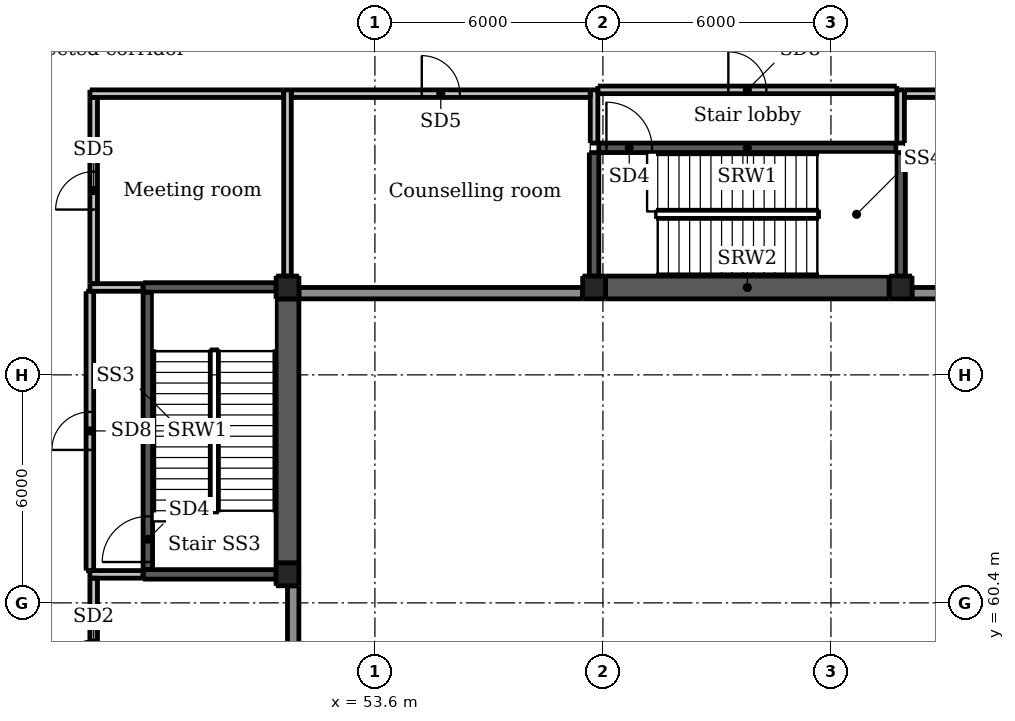
"""IFC4 building model, lengths in metres.
Left out: names, types, materials, properties, quantities, classifications, styles, units other than length and angle.
Written with IfcOpenShell. Run it as: python <this file> out.ifc"""

import sys

from ifc_helpers import new_model, si_unit, direction, frame, frame_2d, origin, origin_2d, place, context, subcontext, project, spatial, rectangle, extrude, element, fill, save


model = new_model("IFC4")
c1 = context("Model", 3, precision=1e-05, world=origin(), true_north=direction((0.0, 1.0)))
c2 = subcontext(c1, "Body", "Model", "MODEL_VIEW")
j1 = project(units=[si_unit("LENGTHUNIT", "METRE"), si_unit("PLANEANGLEUNIT", "RADIAN")], contexts=[c1])
p1 = place(None, origin())
s1 = spatial("IfcSite", under=j1, at=p1, CompositionType="ELEMENT")
p2 = place(p1, origin())
s2 = spatial("IfcBuilding", under=s1, at=p2, CompositionType="ELEMENT")
p3 = place(p2, origin())
s3 = spatial("IfcBuildingStorey", under=s2, at=p3, CompositionType="ELEMENT", Elevation=0.0)
for number, where, z_axis, x_axis in (
    (1, (59.6, 67.4, -2.5), (0.0, 0.0, 1.0), (1.0, 0.0, 0.0)),
    (2, (65.6, 67.4, -2.5), (0.0, 0.0, 1.0), (1.0, 0.0, 0.0)),
    (3, (52.6, 60.4, -2.5), (0.0, 0.0, 1.0), (1.0, 0.0, 0.0)),
):
    element("IfcColumn", number, at=place(p3, frame(where, z_axis=z_axis, x_axis=x_axis)), inside=s3, PredefinedType="COLUMN", context=c2, shape_type="SweptSolid", body=[
        extrude(rectangle(XDim=1.2, YDim=1.2, at=origin_2d()), origin(), (0.0, 0.0, 1.0), 7.7),
    ])
p4 = place(p3, frame((55.2, 64.8, -2.5), z_axis=(0.0, 0.0, 1.0), x_axis=(1.0, 0.0, 0.0)))
e4 = element("IfcColumn", 4, at=p4, inside=s3, PredefinedType="COLUMN", context=c2, shape_type="SweptSolid", body=[
    extrude(rectangle(XDim=3.2, YDim=3.2, at=origin_2d()), origin(), (0.0, 0.0, 1.0), 7.7),
])
for number, where, z_axis, x_axis in (
    (5, (51.3, 61.15, -0.3), (0.0, 0.0, 1.0), (1.0, 0.0, 0.0)),
    (6, (51.3, 68.7, -0.3), (0.0, 0.0, 1.0), (1.0, 0.0, 0.0)),
    (7, (59.367, 68.7, -0.3), (0.0, 0.0, 1.0), (1.0, 0.0, 0.0)),
    (8, (67.433, 68.7, -0.3), (0.0, 0.0, 1.0), (1.0, 0.0, 0.0)),
):
    element("IfcColumn", number, at=place(p3, frame(where, z_axis=z_axis, x_axis=x_axis)), inside=s3, PredefinedType="COLUMN", context=c2, shape_type="SweptSolid", body=[
        extrude(rectangle(XDim=0.6, YDim=0.6, at=origin_2d()), origin(), (0.0, 0.0, 1.0), 5.5),
    ])
p5 = place(p3, frame((47.625, 61.275, -0.3), z_axis=(0.0, 0.0, 1.0), x_axis=(0.0, 1.0, 0.0)))
e9 = element("IfcWall", 9, at=p5, inside=s3, PredefinedType="SHEAR", context=c2, shape_type="SweptSolid", body=[
    extrude(rectangle(XDim=7.3, YDim=0.25, at=frame_2d((3.65, 0.0))), origin(), (0.0, 0.0, 1.0), 5.5),
])
p6 = place(p5, frame((0.2, 0.0, 0.3)))
e10 = element("IfcOpeningElement", 10, at=p6, cuts=e9, PredefinedType="OPENING", context=c2, shape_type="SweptSolid", body=[
    extrude(rectangle(XDim=1.2, YDim=2.1, at=frame_2d((0.6, 1.05))), frame((0.0, 0.135, 0.0), z_axis=(0.0, -1.0, 0.0), x_axis=(1.0, 0.0, 0.0)), (0.0, 0.0, 1.0), 0.27),
])
for number, where, z_axis, x_axis in (
    (11, (47.5, 61.15, -0.3), (0.0, 0.0, 1.0), (1.0, 0.0, 0.0)),
    (12, (47.5, 68.7, -0.3), (0.0, 0.0, 1.0), (1.0, 0.0, 0.0)),
):
    element("IfcWall", number, at=place(p3, frame(where, z_axis=z_axis, x_axis=x_axis)), inside=s3, PredefinedType="SHEAR", context=c2, shape_type="SweptSolid", body=[
        extrude(rectangle(XDim=3.5, YDim=0.25, at=frame_2d((1.75, 0.0))), origin(), (0.0, 0.0, 1.0), 5.5),
    ])
p7 = place(p3, frame((51.3, 61.45, -0.3), z_axis=(0.0, 0.0, 1.0), x_axis=(0.0, 1.0, 0.0)))
e13 = element("IfcWall", 13, at=p7, inside=s3, PredefinedType="SHEAR", context=c2, shape_type="SweptSolid", body=[
    extrude(rectangle(XDim=6.95, YDim=0.6, at=frame_2d((3.475, 0.0))), origin(), (0.0, 0.0, 1.0), 5.5),
])
p8 = place(p3, frame((59.492, 72.375, -0.3), z_axis=(0.0, 0.0, 1.0), x_axis=(1.0, 0.0, 0.0)))
e14 = element("IfcWall", 14, at=p8, inside=s3, PredefinedType="SHEAR", context=c2, shape_type="SweptSolid", body=[
    extrude(rectangle(XDim=7.816, YDim=0.25, at=frame_2d((3.908, 0.0))), origin(), (0.0, 0.0, 1.0), 5.5),
])
p9 = place(p8, frame((0.2, 0.0, 0.3)))
e15 = element("IfcOpeningElement", 15, at=p9, cuts=e14, PredefinedType="OPENING", context=c2, shape_type="SweptSolid", body=[
    extrude(rectangle(XDim=1.2, YDim=2.1, at=frame_2d((0.6, 1.05))), frame((0.0, 0.135, 0.0), z_axis=(0.0, -1.0, 0.0), x_axis=(1.0, 0.0, 0.0)), (0.0, 0.0, 1.0), 0.27),
])
for number, where, z_axis, x_axis in (
    (16, (59.367, 69.0, -0.3), (0.0, 0.0, 1.0), (0.0, 1.0, 0.0)),
    (17, (67.433, 69.0, -0.3), (0.0, 0.0, 1.0), (0.0, 1.0, 0.0)),
):
    element("IfcWall", number, at=place(p3, frame(where, z_axis=z_axis, x_axis=x_axis)), inside=s3, PredefinedType="SHEAR", context=c2, shape_type="SweptSolid", body=[
        extrude(rectangle(XDim=3.25, YDim=0.25, at=frame_2d((1.625, 0.0))), origin(), (0.0, 0.0, 1.0), 5.5),
    ])
p10 = place(p3, frame((59.667, 68.7, -0.3), z_axis=(0.0, 0.0, 1.0), x_axis=(1.0, 0.0, 0.0)))
e18 = element("IfcWall", 18, at=p10, inside=s3, PredefinedType="SHEAR", context=c2, shape_type="SweptSolid", body=[
    extrude(rectangle(XDim=7.466, YDim=0.6, at=frame_2d((3.733, 0.0))), origin(), (0.0, 0.0, 1.0), 5.5),
])
p11 = place(p3, frame((52.0, 67.875, 0.0), z_axis=(0.0, 0.0, 1.0), x_axis=(1.0, 0.0, 0.0)))
e19 = element("IfcWall", 19, at=p11, inside=s3, PredefinedType="SOLIDWALL", context=c2, shape_type="SweptSolid", body=[
    extrude(rectangle(XDim=7.0, YDim=0.25, at=frame_2d((3.5, 0.0))), origin(), (0.0, 0.0, 1.0), 5.2),
])
for number, where, z_axis, x_axis in (
    (20, (60.2, 67.875, 0.0), (0.0, 0.0, 1.0), (1.0, 0.0, 0.0)),
    (21, (66.2, 67.875, 0.0), (0.0, 0.0, 1.0), (1.0, 0.0, 0.0)),
    (22, (52.125, 55.0, 0.0), (0.0, 0.0, 1.0), (0.0, 1.0, 0.0)),
):
    element("IfcWall", number, at=place(p3, frame(where, z_axis=z_axis, x_axis=x_axis)), inside=s3, PredefinedType="SOLIDWALL", context=c2, shape_type="SweptSolid", body=[
        extrude(rectangle(XDim=4.8, YDim=0.25, at=frame_2d((2.4, 0.0))), origin(), (0.0, 0.0, 1.0), 5.2),
    ])
p12 = place(p3, frame((52.125, 61.0, 0.0), z_axis=(0.0, 0.0, 1.0), x_axis=(0.0, 1.0, 0.0)))
e23 = element("IfcWall", 23, at=p12, inside=s3, PredefinedType="SOLIDWALL", context=c2, shape_type="SweptSolid", body=[
    extrude(rectangle(XDim=7.0, YDim=0.25, at=frame_2d((3.5, 0.0))), origin(), (0.0, 0.0, 1.0), 5.2),
])
p13 = place(p3, frame((51.45, 53.9, 0.0), z_axis=(0.0, 0.0, 1.0), x_axis=(0.0, 1.0, 0.0)))
e24 = element("IfcWall", 24, at=p13, inside=s3, PredefinedType="SOLIDWALL", context=c2, shape_type="SweptSolid", body=[
    extrude(rectangle(XDim=6.95, YDim=0.3, at=frame_2d((3.475, 0.0))), origin(), (0.0, 0.0, 1.0), 4.3),
])
p14 = place(p3, frame((51.6, 68.55, 0.0), z_axis=(0.0, 0.0, 1.0), x_axis=(1.0, 0.0, 0.0)))
e25 = element("IfcWall", 25, at=p14, inside=s3, PredefinedType="SOLIDWALL", context=c2, shape_type="SweptSolid", body=[
    extrude(rectangle(XDim=7.467, YDim=0.3, at=frame_2d((3.733, 0.0))), origin(), (0.0, 0.0, 1.0), 4.3),
])
p15 = place(p3, frame((67.733, 68.55, 0.0), z_axis=(0.0, 0.0, 1.0), x_axis=(1.0, 0.0, 0.0)))
e26 = element("IfcWall", 26, at=p15, inside=s3, PredefinedType="SOLIDWALL", context=c2, shape_type="SweptSolid", body=[
    extrude(rectangle(XDim=7.467, YDim=0.3, at=frame_2d((3.733, 0.0))), origin(), (0.0, 0.0, 1.0), 4.3),
])
p16 = place(p3, frame((53.2, 60.4, 0.0), z_axis=(0.0, 0.0, 1.0), x_axis=(1.0, 0.0, 0.0)))
e27 = element("IfcWall", 27, at=p16, inside=s3, PredefinedType="PARTITIONING", context=c2, shape_type="SweptSolid", body=[
    extrude(rectangle(XDim=6.28, YDim=0.15, at=frame_2d((3.14, 0.0))), origin(), (0.0, 0.0, 1.0), 4.797),
])
p17 = place(p3, frame((59.495, 60.4, 0.0), z_axis=(0.0, 0.0, 1.0), x_axis=(1.0, 0.0, 0.0)))
e28 = element("IfcWall", 28, at=p17, inside=s3, PredefinedType="PARTITIONING", context=c2, shape_type="SweptSolid", body=[
    extrude(rectangle(XDim=0.211, YDim=0.15, at=frame_2d((0.105, 0.0))), origin(), (0.0, 0.0, 1.0), 4.66),
])
p18 = place(p3, frame((59.705, 60.4, 0.0), z_axis=(0.0, 0.0, 1.0), x_axis=(1.0, 0.0, 0.0)))
e29 = element("IfcWall", 29, at=p18, inside=s3, PredefinedType="PARTITIONING", context=c2, shape_type="SweptSolid", body=[
    extrude(rectangle(XDim=5.79, YDim=0.15, at=frame_2d((2.895, 0.0))), origin(), (0.0, 0.0, 1.0), 5.2),
])
p19 = place(p18, frame((2.395, 0.0, 0.0)))
e30 = element("IfcOpeningElement", 30, at=p19, cuts=e29, PredefinedType="OPENING", context=c2, shape_type="SweptSolid", body=[
    extrude(rectangle(XDim=1.0, YDim=2.1, at=frame_2d((0.5, 1.05))), frame((0.0, 0.085, 0.0), z_axis=(0.0, -1.0, 0.0), x_axis=(1.0, 0.0, 0.0)), (0.0, 0.0, 1.0), 0.17),
])
p20 = place(p3, frame((65.495, 60.4, 0.0), z_axis=(0.0, 0.0, 1.0), x_axis=(1.0, 0.0, 0.0)))
e31 = element("IfcWall", 31, at=p20, inside=s3, PredefinedType="PARTITIONING", context=c2, shape_type="SweptSolid", body=[
    extrude(rectangle(XDim=0.18, YDim=0.15, at=frame_2d((0.09, 0.0))), origin(), (0.0, 0.0, 1.0), 4.667),
])
p21 = place(p3, frame((66.425, 63.4, 0.0), z_axis=(0.0, 0.0, 1.0), x_axis=(1.0, 0.0, 0.0)))
e32 = element("IfcWall", 32, at=p21, inside=s3, PredefinedType="PARTITIONING", context=c2, shape_type="SweptSolid", body=[
    extrude(rectangle(XDim=4.35, YDim=0.15, at=frame_2d((2.175, 0.0))), origin(), (0.0, 0.0, 1.0), 5.2),
])
p22 = place(p21, frame((1.675, 0.0, 0.0)))
e33 = element("IfcOpeningElement", 33, at=p22, cuts=e32, PredefinedType="OPENING", context=c2, shape_type="SweptSolid", body=[
    extrude(rectangle(XDim=1.0, YDim=2.1, at=frame_2d((0.5, 1.05))), frame((0.0, 0.085, 0.0), z_axis=(0.0, -1.0, 0.0), x_axis=(1.0, 0.0, 0.0)), (0.0, 0.0, 1.0), 0.17),
])
p23 = place(p3, frame((59.6, 54.505, 0.0), z_axis=(0.0, 0.0, 1.0), x_axis=(0.0, 1.0, 0.0)))
e34 = element("IfcWall", 34, at=p23, inside=s3, PredefinedType="PARTITIONING", context=c2, shape_type="SweptSolid", body=[
    extrude(rectangle(XDim=5.82, YDim=0.15, at=frame_2d((2.91, 0.0))), origin(), (0.0, 0.0, 1.0), 4.66),
])
p24 = place(p23, frame((2.396, 0.0, 0.0)))
e35 = element("IfcOpeningElement", 35, at=p24, cuts=e34, PredefinedType="OPENING", context=c2, shape_type="SweptSolid", body=[
    extrude(rectangle(XDim=1.0, YDim=2.1, at=frame_2d((0.5, 1.05))), frame((0.0, 0.085, 0.0), z_axis=(0.0, -1.0, 0.0), x_axis=(1.0, 0.0, 0.0)), (0.0, 0.0, 1.0), 0.17),
])
p25 = place(p3, frame((65.6, 60.475, 0.0), z_axis=(0.0, 0.0, 1.0), x_axis=(0.0, 1.0, 0.0)))
e36 = element("IfcWall", 36, at=p25, inside=s3, PredefinedType="PARTITIONING", context=c2, shape_type="SweptSolid", body=[
    extrude(rectangle(XDim=6.325, YDim=0.15, at=frame_2d((3.163, 0.0))), origin(), (0.0, 0.0, 1.0), 4.667),
])
p26 = place(p3, frame((66.5, 63.475, 0.0), z_axis=(0.0, 0.0, 1.0), x_axis=(0.0, 1.0, 0.0)))
e37 = element("IfcWall", 37, at=p26, inside=s3, PredefinedType="PARTITIONING", context=c2, shape_type="SweptSolid", body=[
    extrude(rectangle(XDim=3.83, YDim=0.15, at=frame_2d((1.915, 0.0))), origin(), (0.0, 0.0, 1.0), 5.2),
])
p27 = place(p26, frame((1.075, 0.0, 0.0)))
e38 = element("IfcOpeningElement", 38, at=p27, cuts=e37, PredefinedType="OPENING", context=c2, shape_type="SweptSolid", body=[
    extrude(rectangle(XDim=0.8, YDim=2.1, at=frame_2d((0.4, 1.05))), frame((0.0, 0.085, 0.0), z_axis=(0.0, -1.0, 0.0), x_axis=(1.0, 0.0, 0.0)), (0.0, 0.0, 1.0), 0.17),
])
p28 = place(p3, frame((66.5, 67.305, 0.0), z_axis=(0.0, 0.0, 1.0), x_axis=(0.0, 1.0, 0.0)))
e39 = element("IfcWall", 39, at=p28, inside=s3, PredefinedType="PARTITIONING", context=c2, shape_type="SweptSolid", body=[
    extrude(rectangle(XDim=0.19, YDim=0.15, at=frame_2d((0.095, 0.0))), origin(), (0.0, 0.0, 1.0), 4.747),
])
p29 = place(p3, frame((66.5, 67.495, 0.0), z_axis=(0.0, 0.0, 1.0), x_axis=(0.0, 1.0, 0.0)))
e40 = element("IfcWall", 40, at=p29, inside=s3, PredefinedType="PARTITIONING", context=c2, shape_type="SweptSolid", body=[
    extrude(rectangle(XDim=0.245, YDim=0.15, at=frame_2d((0.123, 0.0))), origin(), (0.0, 0.0, 1.0), 5.2),
])
p30 = place(p3, frame((67.76, 63.475, 0.0), z_axis=(0.0, 0.0, 1.0), x_axis=(0.0, 1.0, 0.0)))
e41 = element("IfcWall", 41, at=p30, inside=s3, PredefinedType="PARTITIONING", context=c2, shape_type="SweptSolid", body=[
    extrude(rectangle(XDim=3.83, YDim=0.1, at=frame_2d((1.915, 0.0))), origin(), (0.0, 0.0, 1.0), 5.2),
])
p31 = place(p3, frame((67.76, 67.305, 0.0), z_axis=(0.0, 0.0, 1.0), x_axis=(0.0, 1.0, 0.0)))
e42 = element("IfcWall", 42, at=p31, inside=s3, PredefinedType="PARTITIONING", context=c2, shape_type="SweptSolid", body=[
    extrude(rectangle(XDim=0.19, YDim=0.1, at=frame_2d((0.095, 0.0))), origin(), (0.0, 0.0, 1.0), 4.747),
])
p32 = place(p3, frame((67.76, 67.495, 0.0), z_axis=(0.0, 0.0, 1.0), x_axis=(0.0, 1.0, 0.0)))
e43 = element("IfcWall", 43, at=p32, inside=s3, PredefinedType="PARTITIONING", context=c2, shape_type="SweptSolid", body=[
    extrude(rectangle(XDim=0.245, YDim=0.1, at=frame_2d((0.123, 0.0))), origin(), (0.0, 0.0, 1.0), 5.2),
])
p33 = place(p3, frame((46.2, 56.9, 0.0), z_axis=(0.0, 0.0, 1.0), x_axis=(0.0, 1.0, 0.0)))
e44 = element("IfcWall", 44, at=p33, inside=s3, PredefinedType="PARTITIONING", context=c2, shape_type="SweptSolid", body=[
    extrude(rectangle(XDim=4.15, YDim=0.2, at=frame_2d((2.075, 0.0))), origin(), (0.0, 0.0, 1.0), 4.1),
])
p34 = place(p33, frame((1.625, 0.0, 0.0)))
e45 = element("IfcOpeningElement", 45, at=p34, cuts=e44, PredefinedType="OPENING", context=c2, shape_type="SweptSolid", body=[
    extrude(rectangle(XDim=0.9, YDim=2.1, at=frame_2d((0.45, 1.05))), frame((0.0, 0.11, 0.0), z_axis=(0.0, -1.0, 0.0), x_axis=(1.0, 0.0, 0.0)), (0.0, 0.0, 1.0), 0.22),
])
p35 = place(p3, frame((46.2, 68.8, 0.0), z_axis=(0.0, 0.0, 1.0), x_axis=(0.0, 1.0, 0.0)))
e46 = element("IfcWall", 46, at=p35, inside=s3, PredefinedType="PARTITIONING", context=c2, shape_type="SweptSolid", body=[
    extrude(rectangle(XDim=4.9, YDim=0.2, at=frame_2d((2.45, 0.0))), origin(), (0.0, 0.0, 1.0), 4.1),
])
p36 = place(p35, frame((1.95, 0.0, 0.0)))
e47 = element("IfcOpeningElement", 47, at=p36, cuts=e46, PredefinedType="OPENING", context=c2, shape_type="SweptSolid", body=[
    extrude(rectangle(XDim=1.0, YDim=2.1, at=frame_2d((0.5, 1.05))), frame((0.0, 0.11, 0.0), z_axis=(0.0, -1.0, 0.0), x_axis=(1.0, 0.0, 0.0)), (0.0, 0.0, 1.0), 0.22),
])
for number, where, z_axis, x_axis in (
    (48, (46.1, 61.15, 0.0), (0.0, 0.0, 1.0), (1.0, 0.0, 0.0)),
    (49, (46.1, 68.7, 0.0), (0.0, 0.0, 1.0), (1.0, 0.0, 0.0)),
):
    element("IfcWall", number, at=place(p3, frame(where, z_axis=z_axis, x_axis=x_axis)), inside=s3, PredefinedType="PARTITIONING", context=c2, shape_type="SweptSolid", body=[
        extrude(rectangle(XDim=1.4, YDim=0.2, at=frame_2d((0.7, 0.0))), origin(), (0.0, 0.0, 1.0), 4.1),
    ])
p37 = place(p3, frame((51.4, 73.8, 0.0), z_axis=(0.0, 0.0, 1.0), x_axis=(1.0, 0.0, 0.0)))
e50 = element("IfcWall", 50, at=p37, inside=s3, PredefinedType="PARTITIONING", context=c2, shape_type="SweptSolid", body=[
    extrude(rectangle(XDim=7.867, YDim=0.2, at=frame_2d((3.934, 0.0))), origin(), (0.0, 0.0, 1.0), 4.1),
])
p38 = place(p37, frame((3.434, 0.0, 0.0)))
e51 = element("IfcOpeningElement", 51, at=p38, cuts=e50, PredefinedType="OPENING", context=c2, shape_type="SweptSolid", body=[
    extrude(rectangle(XDim=1.0, YDim=2.1, at=frame_2d((0.5, 1.05))), frame((0.0, 0.11, 0.0), z_axis=(0.0, -1.0, 0.0), x_axis=(1.0, 0.0, 0.0)), (0.0, 0.0, 1.0), 0.22),
])
p39 = place(p3, frame((67.533, 73.8, 0.0), z_axis=(0.0, 0.0, 1.0), x_axis=(1.0, 0.0, 0.0)))
e52 = element("IfcWall", 52, at=p39, inside=s3, PredefinedType="PARTITIONING", context=c2, shape_type="SweptSolid", body=[
    extrude(rectangle(XDim=7.867, YDim=0.2, at=frame_2d((3.934, 0.0))), origin(), (0.0, 0.0, 1.0), 4.1),
])
p40 = place(p39, frame((3.483, 0.0, 0.0)))
e53 = element("IfcOpeningElement", 53, at=p40, cuts=e52, PredefinedType="OPENING", context=c2, shape_type="SweptSolid", body=[
    extrude(rectangle(XDim=0.9, YDim=2.1, at=frame_2d((0.45, 1.05))), frame((0.0, 0.11, 0.0), z_axis=(0.0, -1.0, 0.0), x_axis=(1.0, 0.0, 0.0)), (0.0, 0.0, 1.0), 0.22),
])
for number, where, z_axis, x_axis in (
    (54, (59.367, 72.5, 0.0), (0.0, 0.0, 1.0), (0.0, 1.0, 0.0)),
    (55, (67.433, 72.5, 0.0), (0.0, 0.0, 1.0), (0.0, 1.0, 0.0)),
):
    element("IfcWall", number, at=place(p3, frame(where, z_axis=z_axis, x_axis=x_axis)), inside=s3, PredefinedType="PARTITIONING", context=c2, shape_type="SweptSolid", body=[
        extrude(rectangle(XDim=1.4, YDim=0.2, at=frame_2d((0.7, 0.0))), origin(), (0.0, 0.0, 1.0), 4.1),
    ])
p41 = place(p3, frame((46.1, 73.8, 0.0), z_axis=(0.0, 0.0, 1.0), x_axis=(1.0, 0.0, 0.0)))
e56 = element("IfcWall", 56, at=p41, inside=s3, PredefinedType="PARTITIONING", context=c2, shape_type="SweptSolid", body=[
    extrude(rectangle(XDim=5.1, YDim=0.2, at=frame_2d((2.55, 0.0))), origin(), (0.0, 0.0, 1.0), 4.1),
])
p42 = place(p3, frame((51.3, 69.0, 0.0), z_axis=(0.0, 0.0, 1.0), x_axis=(0.0, 1.0, 0.0)))
e57 = element("IfcWall", 57, at=p42, inside=s3, PredefinedType="PARTITIONING", context=c2, shape_type="SweptSolid", body=[
    extrude(rectangle(XDim=4.9, YDim=0.2, at=frame_2d((2.45, 0.0))), origin(), (0.0, 0.0, 1.0), 4.1),
])
p43 = place(p3, frame((46.1, 61.25, 0.0), z_axis=(0.0, 0.0, 1.0), x_axis=(0.0, 1.0, 0.0)))
e58 = element("IfcWall", 58, at=p43, inside=s3, PredefinedType="PARTITIONING", context=c2, shape_type="SweptSolid", body=[
    extrude(rectangle(XDim=7.35, YDim=0.2, at=frame_2d((3.675, 0.0))), origin(), (0.0, 0.0, 1.0), 4.1),
])
p44 = place(p43, frame((3.175, 0.0, 0.0)))
e59 = element("IfcOpeningElement", 59, at=p44, cuts=e58, PredefinedType="OPENING", context=c2, shape_type="SweptSolid", body=[
    extrude(rectangle(XDim=1.0, YDim=2.1, at=frame_2d((0.5, 1.05))), frame((0.0, 0.11, 0.0), z_axis=(0.0, -1.0, 0.0), x_axis=(1.0, 0.0, 0.0)), (0.0, 0.0, 1.0), 0.22),
])
p45 = place(p3, frame((59.467, 73.9, 0.0), z_axis=(0.0, 0.0, 1.0), x_axis=(1.0, 0.0, 0.0)))
e60 = element("IfcWall", 60, at=p45, inside=s3, PredefinedType="PARTITIONING", context=c2, shape_type="SweptSolid", body=[
    extrude(rectangle(XDim=7.866, YDim=0.2, at=frame_2d((3.933, 0.0))), origin(), (0.0, 0.0, 1.0), 4.1),
])
p46 = place(p45, frame((3.433, 0.0, 0.0)))
e61 = element("IfcOpeningElement", 61, at=p46, cuts=e60, PredefinedType="OPENING", context=c2, shape_type="SweptSolid", body=[
    extrude(rectangle(XDim=1.0, YDim=2.1, at=frame_2d((0.5, 1.05))), frame((0.0, 0.11, 0.0), z_axis=(0.0, -1.0, 0.0), x_axis=(1.0, 0.0, 0.0)), (0.0, 0.0, 1.0), 0.22),
])
p47 = place(p19, origin())
e62 = element("IfcDoor", 62, at=p47, inside=s3, OperationType="SINGLE_SWING_LEFT", PredefinedType="DOOR", context=c2, shape_type="SweptSolid", body=[
    extrude(rectangle(XDim=1.0, YDim=2.1, at=frame_2d((0.5, 1.05))), frame((0.0, 0.025, 0.0), z_axis=(0.0, -1.0, 0.0), x_axis=(1.0, 0.0, 0.0)), (0.0, 0.0, 1.0), 0.05),
])
fill(e30, e62)
p48 = place(p27, origin())
e63 = element("IfcDoor", 63, at=p48, inside=s3, OperationType="SINGLE_SWING_LEFT", PredefinedType="DOOR", context=c2, shape_type="SweptSolid", body=[
    extrude(rectangle(XDim=0.8, YDim=2.1, at=frame_2d((0.4, 1.05))), frame((0.0, 0.025, 0.0), z_axis=(0.0, -1.0, 0.0), x_axis=(1.0, 0.0, 0.0)), (0.0, 0.0, 1.0), 0.05),
])
fill(e38, e63)
p49 = place(p22, origin())
e64 = element("IfcDoor", 64, at=p49, inside=s3, OperationType="SINGLE_SWING_LEFT", PredefinedType="DOOR", context=c2, shape_type="SweptSolid", body=[
    extrude(rectangle(XDim=1.0, YDim=2.1, at=frame_2d((0.5, 1.05))), frame((0.0, 0.025, 0.0), z_axis=(0.0, -1.0, 0.0), x_axis=(1.0, 0.0, 0.0)), (0.0, 0.0, 1.0), 0.05),
])
fill(e33, e64)
p50 = place(p34, origin())
e65 = element("IfcDoor", 65, at=p50, inside=s3, OperationType="SINGLE_SWING_LEFT", PredefinedType="DOOR", context=c2, shape_type="SweptSolid", body=[
    extrude(rectangle(XDim=0.9, YDim=2.1, at=frame_2d((0.45, 1.05))), frame((0.0, 0.025, 0.0), z_axis=(0.0, -1.0, 0.0), x_axis=(1.0, 0.0, 0.0)), (0.0, 0.0, 1.0), 0.05),
])
fill(e45, e65)
p51 = place(p36, origin())
e66 = element("IfcDoor", 66, at=p51, inside=s3, OperationType="SINGLE_SWING_LEFT", PredefinedType="DOOR", context=c2, shape_type="SweptSolid", body=[
    extrude(rectangle(XDim=1.0, YDim=2.1, at=frame_2d((0.5, 1.05))), frame((0.0, 0.025, 0.0), z_axis=(0.0, -1.0, 0.0), x_axis=(1.0, 0.0, 0.0)), (0.0, 0.0, 1.0), 0.05),
])
fill(e47, e66)
p52 = place(p38, origin())
e67 = element("IfcDoor", 67, at=p52, inside=s3, OperationType="SINGLE_SWING_LEFT", PredefinedType="DOOR", context=c2, shape_type="SweptSolid", body=[
    extrude(rectangle(XDim=1.0, YDim=2.1, at=frame_2d((0.5, 1.05))), frame((0.0, 0.025, 0.0), z_axis=(0.0, -1.0, 0.0), x_axis=(1.0, 0.0, 0.0)), (0.0, 0.0, 1.0), 0.05),
])
fill(e51, e67)
p53 = place(p44, origin())
e68 = element("IfcDoor", 68, at=p53, inside=s3, OperationType="SINGLE_SWING_LEFT", PredefinedType="DOOR", context=c2, shape_type="SweptSolid", body=[
    extrude(rectangle(XDim=1.0, YDim=2.1, at=frame_2d((0.5, 1.05))), frame((0.0, 0.025, 0.0), z_axis=(0.0, -1.0, 0.0), x_axis=(1.0, 0.0, 0.0)), (0.0, 0.0, 1.0), 0.05),
])
fill(e59, e68)
p54 = place(p46, origin())
e69 = element("IfcDoor", 69, at=p54, inside=s3, OperationType="SINGLE_SWING_LEFT", PredefinedType="DOOR", context=c2, shape_type="SweptSolid", body=[
    extrude(rectangle(XDim=1.0, YDim=2.1, at=frame_2d((0.5, 1.05))), frame((0.0, 0.025, 0.0), z_axis=(0.0, -1.0, 0.0), x_axis=(1.0, 0.0, 0.0)), (0.0, 0.0, 1.0), 0.05),
])
fill(e61, e69)
p55 = place(p6, origin())
e70 = element("IfcDoor", 70, at=p55, inside=s3, OperationType="SINGLE_SWING_LEFT", PredefinedType="DOOR", context=c2, shape_type="SweptSolid", body=[
    extrude(rectangle(XDim=1.2, YDim=2.1, at=frame_2d((0.6, 1.05))), frame((0.0, 0.025, 0.0), z_axis=(0.0, -1.0, 0.0), x_axis=(1.0, 0.0, 0.0)), (0.0, 0.0, 1.0), 0.05),
])
fill(e10, e70)
p56 = place(p9, origin())
e71 = element("IfcDoor", 71, at=p56, inside=s3, OperationType="SINGLE_SWING_LEFT", PredefinedType="DOOR", context=c2, shape_type="SweptSolid", body=[
    extrude(rectangle(XDim=1.2, YDim=2.1, at=frame_2d((0.6, 1.05))), frame((0.0, 0.025, 0.0), z_axis=(0.0, -1.0, 0.0), x_axis=(1.0, 0.0, 0.0)), (0.0, 0.0, 1.0), 0.05),
])
fill(e15, e71)
save(model, sys.argv[1])
